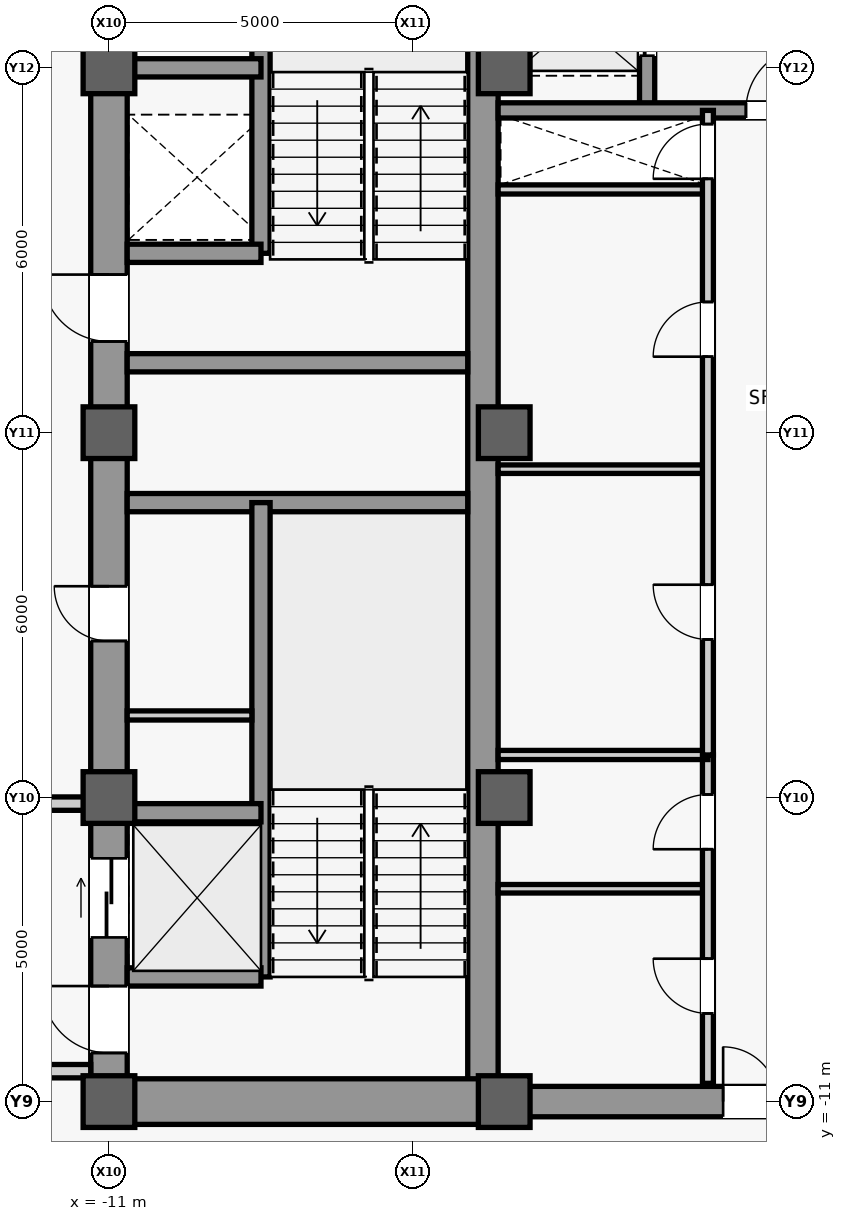
"""IFC4 building model, lengths in metres.
Left out: names, types, materials, properties, quantities, classifications, styles, units other than length and angle.
Written with IfcOpenShell. Run it as: python <this file> out.ifc"""

import sys

from ifc_helpers import new_model, si_unit, direction, frame, frame_2d, origin, origin_2d, place, context, subcontext, project, spatial, rectangle, extrude, source, transform, mapped, element, fill, save


model = new_model("IFC4")
c1 = context("Model", 3, precision=1e-05, world=origin(), true_north=direction((0.0, 1.0)))
c2 = subcontext(c1, "Body", "Model", "MODEL_VIEW")
j1 = project(units=[si_unit("LENGTHUNIT", "METRE"), si_unit("PLANEANGLEUNIT", "RADIAN")], contexts=[c1])
p1 = place(None, origin())
s1 = spatial("IfcSite", under=j1, at=p1, CompositionType="ELEMENT")
p2 = place(p1, origin())
s2 = spatial("IfcBuilding", under=s1, at=p2, CompositionType="ELEMENT")
p3 = place(p2, frame((0.0, 0.0, 203.1)))
s3 = spatial("IfcBuildingStorey", under=s2, at=p3, CompositionType="ELEMENT", Elevation=203.1)
m1 = source(origin(), c2, "Body", "SweptSolid", [
    extrude(rectangle(XDim=22.0, YDim=0.6, at=frame_2d((11.0, 0.0))), origin(), (0.0, 0.0, 1.0), 3.78),
])
p4 = place(p3, frame((-11.0, -11.0, 0.0), z_axis=(0.0, 0.0, 1.0), x_axis=(0.0, 1.0, 0.0)))
e1 = element("IfcWall", 1, at=p4, inside=s3, PredefinedType="SHEAR", context=c2, shape_type="MappedRepresentation", body=[
    mapped(m1, transform((0.0, 0.0, 0.0), scale=1.0)),
])
m2 = source(origin(), c2, "Body", "SweptSolid", [
    extrude(rectangle(XDim=1.1, YDim=2.2, at=frame_2d((0.55, 1.1))), frame((0.0, 0.31, 0.0), z_axis=(0.0, -1.0, 0.0), x_axis=(1.0, 0.0, 0.0)), (0.0, 0.0, 1.0), 0.62),
])
p5 = place(p4, frame((0.8, 0.0, 0.0)))
e2 = element("IfcOpeningElement", 2, at=p5, cuts=e1, PredefinedType="OPENING", context=c2, shape_type="MappedRepresentation", body=[
    mapped(m2, transform((0.0, 0.0, 0.0), scale=1.0)),
])
p6 = place(p4, frame((12.5, 0.0, 0.0)))
e3 = element("IfcOpeningElement", 3, at=p6, cuts=e1, PredefinedType="OPENING", context=c2, shape_type="MappedRepresentation", body=[
    mapped(m2, transform((0.0, 0.0, 0.0), scale=1.0)),
])
m3 = source(origin(), c2, "Body", "SweptSolid", [
    extrude(rectangle(XDim=0.9, YDim=2.15, at=frame_2d((0.45, 1.075))), frame((0.0, 0.31, 0.0), z_axis=(0.0, -1.0, 0.0), x_axis=(1.0, 0.0, 0.0)), (0.0, 0.0, 1.0), 0.62),
])
p7 = place(p4, frame((7.575, 0.0, 0.0)))
e4 = element("IfcOpeningElement", 4, at=p7, cuts=e1, PredefinedType="OPENING", context=c2, shape_type="MappedRepresentation", body=[
    mapped(m3, transform((0.0, 0.0, 0.0), scale=1.0)),
])
m4 = source(origin(), c2, "Body", "SweptSolid", [
    extrude(rectangle(XDim=1.3, YDim=2.3, at=frame_2d((0.65, 1.15))), frame((0.0, 0.31, 0.0), z_axis=(0.0, -1.0, 0.0), x_axis=(1.0, 0.0, 0.0)), (0.0, 0.0, 1.0), 0.62),
])
p8 = place(p4, frame((2.7, 0.0, 0.0)))
e5 = element("IfcOpeningElement", 5, at=p8, cuts=e1, PredefinedType="OPENING", context=c2, shape_type="MappedRepresentation", body=[
    mapped(m4, transform((0.0, 0.0, 0.0), scale=1.0)),
])
m5 = source(origin(), c2, "Body", "SweptSolid", [
    extrude(rectangle(XDim=21.4, YDim=0.5, at=frame_2d((10.7, 0.0))), origin(), (0.0, 0.0, 1.0), 3.78),
])
p9 = place(p3, frame((-4.85, -10.7, 0.0), z_axis=(0.0, 0.0, 1.0), x_axis=(0.0, 1.0, 0.0)))
e6 = element("IfcWall", 6, at=p9, inside=s3, PredefinedType="SHEAR", context=c2, shape_type="MappedRepresentation", body=[
    mapped(m5, transform((0.0, 0.0, 0.0), scale=1.0)),
])
m6 = source(origin(), c2, "Body", "SweptSolid", [
    extrude(rectangle(XDim=5.85, YDim=0.75, at=frame_2d((2.925, 0.0))), origin(), (0.0, 0.0, 1.0), 3.78),
])
p10 = place(p3, frame((-10.7, -11.0, 0.0), z_axis=(0.0, 0.0, 1.0), x_axis=(1.0, 0.0, 0.0)))
e7 = element("IfcWall", 7, at=p10, inside=s3, PredefinedType="SHEAR", context=c2, shape_type="MappedRepresentation", body=[
    mapped(m6, transform((0.0, 0.0, 0.0), scale=1.0)),
])
m7 = source(origin(), c2, "Body", "SweptSolid", [
    extrude(rectangle(XDim=5.6, YDim=0.3, at=frame_2d((2.8, 0.0))), origin(), (0.0, 0.0, 1.0), 3.78),
])
for number, where, z_axis, x_axis in (
    (8, (-10.7, -1.15, 0.0), (0.0, 0.0, 1.0), (1.0, 0.0, 0.0)),
    (9, (-10.7, 1.15, 0.0), (0.0, 0.0, 1.0), (1.0, 0.0, 0.0)),
):
    element("IfcWall", number, at=place(p3, frame(where, z_axis=z_axis, x_axis=x_axis)), inside=s3, PredefinedType="SHEAR", context=c2, shape_type="MappedRepresentation", body=[
        mapped(m7, transform((0.0, 0.0, 0.0), scale=1.0)),
    ])
m8 = source(origin(), c2, "Body", "SweptSolid", [
    extrude(rectangle(XDim=9.2, YDim=0.5, at=frame_2d((4.6, 0.0))), origin(), (0.0, 0.0, 1.0), 3.78),
])
p11 = place(p3, frame((-4.6, -11.0, 0.0), z_axis=(0.0, 0.0, 1.0), x_axis=(1.0, 0.0, 0.0)))
e10 = element("IfcWall", 10, at=p11, inside=s3, PredefinedType="SHEAR", context=c2, shape_type="MappedRepresentation", body=[
    mapped(m8, transform((0.0, 0.0, 0.0), scale=1.0)),
])
m9 = source(origin(), c2, "Body", "SweptSolid", [
    extrude(rectangle(XDim=1.8, YDim=2.25, at=frame_2d((0.9, 1.125))), frame((0.0, 0.26, 0.0), z_axis=(0.0, -1.0, 0.0), x_axis=(1.0, 0.0, 0.0)), (0.0, 0.0, 1.0), 0.52),
])
p12 = place(p11, frame((3.7, 0.0, 0.0)))
e11 = element("IfcOpeningElement", 11, at=p12, cuts=e10, PredefinedType="OPENING", context=c2, shape_type="MappedRepresentation", body=[
    mapped(m9, transform((0.0, 0.0, 0.0), scale=1.0)),
])
m10 = source(origin(), c2, "Body", "SweptSolid", [
    extrude(rectangle(XDim=0.85, YDim=0.85, at=origin_2d()), origin(), (0.0, 0.0, 1.0), 4.0),
])
for number, where, z_axis, x_axis in (
    (12, (-11.0, -11.0, 0.0), (0.0, 0.0, 1.0), (1.0, 0.0, 0.0)),
    (13, (-11.0, -6.0, 0.0), (0.0, 0.0, 1.0), (1.0, 0.0, 0.0)),
    (14, (-11.0, 0.0, 0.0), (0.0, 0.0, 1.0), (1.0, 0.0, 0.0)),
    (15, (-11.0, 6.0, 0.0), (0.0, 0.0, 1.0), (1.0, 0.0, 0.0)),
    (16, (-4.5, -11.0, 0.0), (0.0, 0.0, 1.0), (1.0, 0.0, 0.0)),
    (17, (-4.5, -6.0, 0.0), (0.0, 0.0, 1.0), (1.0, 0.0, 0.0)),
    (18, (-4.5, 0.0, 0.0), (0.0, 0.0, 1.0), (1.0, 0.0, 0.0)),
    (19, (-4.5, 6.0, 0.0), (0.0, 0.0, 1.0), (1.0, 0.0, 0.0)),
):
    element("IfcColumn", number, at=place(p3, frame(where, z_axis=z_axis, x_axis=x_axis)), inside=s3, PredefinedType="COLUMN", context=c2, shape_type="MappedRepresentation", body=[
        mapped(m10, transform((0.0, 0.0, 0.0), scale=1.0)),
    ])
m11 = source(origin(), c2, "Body", "SweptSolid", [
    extrude(rectangle(XDim=7.8, YDim=0.3, at=frame_2d((3.9, 0.0))), origin(), (0.0, 0.0, 1.0), 3.78),
])
p13 = place(p3, frame((-8.5, -8.95, 0.0), z_axis=(0.0, 0.0, 1.0), x_axis=(0.0, 1.0, 0.0)))
e20 = element("IfcWall", 20, at=p13, inside=s3, PredefinedType="SHEAR", context=c2, shape_type="MappedRepresentation", body=[
    mapped(m11, transform((0.0, 0.0, 0.0), scale=1.0)),
])
m12 = source(origin(), c2, "Body", "SweptSolid", [
    extrude(rectangle(XDim=2.2, YDim=0.3, at=frame_2d((1.1, 0.0))), origin(), (0.0, 0.0, 1.0), 3.78),
])
for number, where, z_axis, x_axis in (
    (21, (-10.7, -8.95, 0.0), (0.0, 0.0, 1.0), (1.0, 0.0, 0.0)),
    (22, (-10.7, -6.25, 0.0), (0.0, 0.0, 1.0), (1.0, 0.0, 0.0)),
):
    element("IfcWall", number, at=place(p3, frame(where, z_axis=z_axis, x_axis=x_axis)), inside=s3, PredefinedType="SHEAR", context=c2, shape_type="MappedRepresentation", body=[
        mapped(m12, transform((0.0, 0.0, 0.0), scale=1.0)),
    ])
m13 = source(origin(), c2, "Body", "SweptSolid", [
    extrude(rectangle(XDim=7.75, YDim=0.3, at=frame_2d((3.875, 0.0))), origin(), (0.0, 0.0, 1.0), 3.78),
])
p14 = place(p3, frame((-8.5, 2.95, 0.0), z_axis=(0.0, 0.0, 1.0), x_axis=(0.0, 1.0, 0.0)))
e23 = element("IfcWall", 23, at=p14, inside=s3, PredefinedType="SHEAR", context=c2, shape_type="MappedRepresentation", body=[
    mapped(m13, transform((0.0, 0.0, 0.0), scale=1.0)),
])
for number, where, z_axis, x_axis in (
    (24, (-10.7, 2.95, 0.0), (0.0, 0.0, 1.0), (1.0, 0.0, 0.0)),
    (25, (-10.7, 6.0, 0.0), (0.0, 0.0, 1.0), (1.0, 0.0, 0.0)),
):
    element("IfcWall", number, at=place(p3, frame(where, z_axis=z_axis, x_axis=x_axis)), inside=s3, PredefinedType="SHEAR", context=c2, shape_type="MappedRepresentation", body=[
        mapped(m12, transform((0.0, 0.0, 0.0), scale=1.0)),
    ])
m14 = source(origin(), c2, "Body", "SweptSolid", [
    extrude(rectangle(XDim=2.05, YDim=0.15, at=frame_2d((1.025, 0.0))), origin(), (0.0, 0.0, 1.0), 3.78),
])
p15 = place(p3, frame((-10.7, -4.65, 0.0), z_axis=(0.0, 0.0, 1.0), x_axis=(1.0, 0.0, 0.0)))
e26 = element("IfcWall", 26, at=p15, inside=s3, PredefinedType="PARTITIONING", context=c2, shape_type="MappedRepresentation", body=[
    mapped(m14, transform((0.0, 0.0, 0.0), scale=1.0)),
])
m15 = source(origin(), c2, "Body", "SweptSolid", [
    extrude(rectangle(XDim=4.05, YDim=0.22, at=frame_2d((2.025, 0.0))), origin(), (0.0, 0.0, 1.0), 3.78),
])
p16 = place(p3, frame((-15.35, -10.5, 0.0), z_axis=(0.0, 0.0, 1.0), x_axis=(1.0, 0.0, 0.0)))
e27 = element("IfcWall", 27, at=p16, inside=s3, PredefinedType="PARTITIONING", context=c2, shape_type="MappedRepresentation", body=[
    mapped(m15, transform((0.0, 0.0, 0.0), scale=1.0)),
])
m16 = source(origin(), c2, "Body", "SweptSolid", [
    extrude(rectangle(XDim=4.05, YDim=0.22, at=frame_2d((2.025, 0.0))), origin(), (0.0, 0.0, 1.0), 3.007),
])
p17 = place(p3, frame((-15.35, -6.1, 0.0), z_axis=(0.0, 0.0, 1.0), x_axis=(1.0, 0.0, 0.0)))
e28 = element("IfcWall", 28, at=p17, inside=s3, PredefinedType="PARTITIONING", context=c2, shape_type="MappedRepresentation", body=[
    mapped(m16, transform((0.0, 0.0, 0.0), scale=1.0)),
])
m17 = source(origin(), c2, "Body", "SweptSolid", [
    extrude(rectangle(XDim=3.45, YDim=0.15, at=frame_2d((1.725, 0.0))), origin(), (0.0, 0.0, 1.0), 3.78),
])
p18 = place(p3, frame((-4.6, 4.0, 0.0), z_axis=(0.0, 0.0, 1.0), x_axis=(1.0, 0.0, 0.0)))
e29 = element("IfcWall", 29, at=p18, inside=s3, PredefinedType="PARTITIONING", context=c2, shape_type="MappedRepresentation", body=[
    mapped(m17, transform((0.0, 0.0, 0.0), scale=1.0)),
])
m18 = source(origin(), c2, "Body", "SweptSolid", [
    extrude(rectangle(XDim=3.45, YDim=0.14, at=frame_2d((1.725, 0.0))), origin(), (0.0, 0.0, 1.0), 3.78),
])
p19 = place(p3, frame((-4.6, -7.5, 0.0), z_axis=(0.0, 0.0, 1.0), x_axis=(1.0, 0.0, 0.0)))
e30 = element("IfcWall", 30, at=p19, inside=s3, PredefinedType="PARTITIONING", context=c2, shape_type="MappedRepresentation", body=[
    mapped(m18, transform((0.0, 0.0, 0.0), scale=1.0)),
])
m19 = source(origin(), c2, "Body", "SweptSolid", [
    extrude(rectangle(XDim=5.4, YDim=0.18, at=frame_2d((2.7, 0.0))), origin(), (0.0, 0.0, 1.0), 3.78),
])
p20 = place(p3, frame((-1.15, -10.7, 0.0), z_axis=(0.0, 0.0, 1.0), x_axis=(0.0, 1.0, 0.0)))
e31 = element("IfcWall", 31, at=p20, inside=s3, PredefinedType="PARTITIONING", context=c2, shape_type="MappedRepresentation", body=[
    mapped(m19, transform((0.0, 0.0, 0.0), scale=1.0)),
])
m20 = source(origin(), c2, "Body", "SweptSolid", [
    extrude(rectangle(XDim=0.9, YDim=2.15, at=frame_2d((0.45, 1.075))), frame((0.0, 0.1, 0.0), z_axis=(0.0, -1.0, 0.0), x_axis=(1.0, 0.0, 0.0)), (0.0, 0.0, 1.0), 0.2),
])
p21 = place(p20, frame((1.15, 0.0, 0.0)))
e32 = element("IfcOpeningElement", 32, at=p21, cuts=e31, PredefinedType="OPENING", context=c2, shape_type="MappedRepresentation", body=[
    mapped(m20, transform((0.0, 0.0, 0.0), scale=1.0)),
])
p22 = place(p20, frame((3.85, 0.0, 0.0)))
e33 = element("IfcOpeningElement", 33, at=p22, cuts=e31, PredefinedType="OPENING", context=c2, shape_type="MappedRepresentation", body=[
    mapped(m20, transform((0.0, 0.0, 0.0), scale=1.0)),
])
p23 = place(p3, frame((-4.6, -5.3, 0.0), z_axis=(0.0, 0.0, 1.0), x_axis=(1.0, 0.0, 0.0)))
e34 = element("IfcWall", 34, at=p23, inside=s3, PredefinedType="PARTITIONING", context=c2, shape_type="MappedRepresentation", body=[
    mapped(m17, transform((0.0, 0.0, 0.0), scale=1.0)),
])
m21 = source(origin(), c2, "Body", "SweptSolid", [
    extrude(rectangle(XDim=5.4, YDim=0.25, at=frame_2d((2.7, 0.0))), origin(), (0.0, 0.0, 1.0), 3.78),
])
p24 = place(p3, frame((-2.15, 5.3, 0.0), z_axis=(0.0, 0.0, 1.0), x_axis=(0.0, 1.0, 0.0)))
e35 = element("IfcWall", 35, at=p24, inside=s3, PredefinedType="SHEAR", context=c2, shape_type="MappedRepresentation", body=[
    mapped(m21, transform((0.0, 0.0, 0.0), scale=1.0)),
])
m22 = source(origin(), c2, "Body", "SweptSolid", [
    extrude(rectangle(XDim=1.2, YDim=2.3, at=frame_2d((0.6, 1.15))), frame((0.0, 0.135, 0.0), z_axis=(0.0, -1.0, 0.0), x_axis=(1.0, 0.0, 0.0)), (0.0, 0.0, 1.0), 0.27),
])
p25 = place(p24, frame((3.3, 0.0, 0.0)))
e36 = element("IfcOpeningElement", 36, at=p25, cuts=e35, PredefinedType="OPENING", context=c2, shape_type="MappedRepresentation", body=[
    mapped(m22, transform((0.0, 0.0, 0.0), scale=1.0)),
])
p26 = place(p24, frame((0.9, 0.0, 0.0)))
e37 = element("IfcOpeningElement", 37, at=p26, cuts=e35, PredefinedType="OPENING", context=c2, shape_type="MappedRepresentation", body=[
    mapped(m22, transform((0.0, 0.0, 0.0), scale=1.0)),
])
m23 = source(origin(), c2, "Body", "SweptSolid", [
    extrude(rectangle(XDim=9.2, YDim=0.25, at=frame_2d((4.6, 0.0))), origin(), (0.0, 0.0, 1.0), 3.78),
])
p27 = place(p3, frame((-4.6, 5.3, 0.0), z_axis=(0.0, 0.0, 1.0), x_axis=(1.0, 0.0, 0.0)))
e38 = element("IfcWall", 38, at=p27, inside=s3, PredefinedType="SHEAR", context=c2, shape_type="MappedRepresentation", body=[
    mapped(m23, transform((0.0, 0.0, 0.0), scale=1.0)),
])
m24 = source(origin(), c2, "Body", "SweptSolid", [
    extrude(rectangle(XDim=1.05, YDim=2.2, at=frame_2d((0.525, 1.1))), frame((0.0, 0.135, 0.0), z_axis=(0.0, -1.0, 0.0), x_axis=(1.0, 0.0, 0.0)), (0.0, 0.0, 1.0), 0.27),
])
p28 = place(p27, frame((4.075, 0.0, 0.0)))
e39 = element("IfcOpeningElement", 39, at=p28, cuts=e38, PredefinedType="OPENING", context=c2, shape_type="MappedRepresentation", body=[
    mapped(m24, transform((0.0, 0.0, 0.0), scale=1.0)),
])
p29 = place(p3, frame((-4.6, -0.6, 0.0), z_axis=(0.0, 0.0, 1.0), x_axis=(1.0, 0.0, 0.0)))
e40 = element("IfcWall", 40, at=p29, inside=s3, PredefinedType="PARTITIONING", context=c2, shape_type="MappedRepresentation", body=[
    mapped(m18, transform((0.0, 0.0, 0.0), scale=1.0)),
])
m25 = source(origin(), c2, "Body", "SweptSolid", [
    extrude(rectangle(XDim=10.6, YDim=0.18, at=frame_2d((5.3, 0.0))), origin(), (0.0, 0.0, 1.0), 3.78),
])
p30 = place(p3, frame((-1.15, -5.3, 0.0), z_axis=(0.0, 0.0, 1.0), x_axis=(0.0, 1.0, 0.0)))
e41 = element("IfcWall", 41, at=p30, inside=s3, PredefinedType="PARTITIONING", context=c2, shape_type="MappedRepresentation", body=[
    mapped(m25, transform((0.0, 0.0, 0.0), scale=1.0)),
])
p31 = place(p30, frame((1.9, 0.0, 0.0)))
e42 = element("IfcOpeningElement", 42, at=p31, cuts=e41, PredefinedType="OPENING", context=c2, shape_type="MappedRepresentation", body=[
    mapped(m20, transform((0.0, 0.0, 0.0), scale=1.0)),
])
p32 = place(p30, frame((6.55, 0.0, 0.0)))
e43 = element("IfcOpeningElement", 43, at=p32, cuts=e41, PredefinedType="OPENING", context=c2, shape_type="MappedRepresentation", body=[
    mapped(m20, transform((0.0, 0.0, 0.0), scale=1.0)),
])
p33 = place(p30, frame((9.475, 0.0, 0.0)))
e44 = element("IfcOpeningElement", 44, at=p33, cuts=e41, PredefinedType="OPENING", context=c2, shape_type="MappedRepresentation", body=[
    mapped(m20, transform((0.0, 0.0, 0.0), scale=1.0)),
])
m26 = source(origin(), c2, "Body", "SweptSolid", [
    extrude(rectangle(XDim=1.1, YDim=2.2, at=frame_2d((0.55, 1.1))), frame((0.0, 0.025, 0.0), z_axis=(0.0, -1.0, 0.0), x_axis=(1.0, 0.0, 0.0)), (0.0, 0.0, 1.0), 0.05),
])
p34 = place(p5, origin())
e45 = element("IfcDoor", 45, at=p34, inside=s3, OperationType="SINGLE_SWING_RIGHT", PredefinedType="DOOR", context=c2, shape_type="MappedRepresentation", body=[
    mapped(m26, transform((0.0, 0.0, 0.0), scale=1.0)),
])
fill(e2, e45)
p35 = place(p6, origin())
e46 = element("IfcDoor", 46, at=p35, inside=s3, OperationType="SINGLE_SWING_RIGHT", PredefinedType="DOOR", context=c2, shape_type="MappedRepresentation", body=[
    mapped(m26, transform((0.0, 0.0, 0.0), scale=1.0)),
])
fill(e3, e46)
m27 = source(origin(), c2, "Body", "SweptSolid", [
    extrude(rectangle(XDim=0.9, YDim=2.15, at=frame_2d((0.45, 1.075))), frame((0.0, 0.025, 0.0), z_axis=(0.0, -1.0, 0.0), x_axis=(1.0, 0.0, 0.0)), (0.0, 0.0, 1.0), 0.05),
])
p36 = place(p7, origin())
e47 = element("IfcDoor", 47, at=p36, inside=s3, OperationType="SINGLE_SWING_RIGHT", PredefinedType="DOOR", context=c2, shape_type="MappedRepresentation", body=[
    mapped(m27, transform((0.0, 0.0, 0.0), scale=1.0)),
])
fill(e4, e47)
p37 = place(p21, origin())
e48 = element("IfcDoor", 48, at=p37, inside=s3, OperationType="SINGLE_SWING_RIGHT", PredefinedType="DOOR", context=c2, shape_type="MappedRepresentation", body=[
    mapped(m27, transform((0.0, 0.0, 0.0), scale=1.0)),
])
fill(e32, e48)
p38 = place(p22, origin())
e49 = element("IfcDoor", 49, at=p38, inside=s3, OperationType="SINGLE_SWING_LEFT", PredefinedType="DOOR", context=c2, shape_type="MappedRepresentation", body=[
    mapped(m27, transform((0.0, 0.0, 0.0), scale=1.0)),
])
fill(e33, e49)
m28 = source(origin(), c2, "Body", "SweptSolid", [
    extrude(rectangle(XDim=1.8, YDim=2.25, at=frame_2d((0.9, 1.125))), frame((0.0, 0.025, 0.0), z_axis=(0.0, -1.0, 0.0), x_axis=(1.0, 0.0, 0.0)), (0.0, 0.0, 1.0), 0.05),
])
p39 = place(p12, origin())
e50 = element("IfcDoor", 50, at=p39, inside=s3, OperationType="SINGLE_SWING_LEFT", PredefinedType="DOOR", context=c2, shape_type="MappedRepresentation", body=[
    mapped(m28, transform((0.0, 0.0, 0.0), scale=1.0)),
])
fill(e11, e50)
m29 = source(origin(), c2, "Body", "SweptSolid", [
    extrude(rectangle(XDim=1.05, YDim=2.2, at=frame_2d((0.525, 1.1))), frame((0.0, 0.025, 0.0), z_axis=(0.0, -1.0, 0.0), x_axis=(1.0, 0.0, 0.0)), (0.0, 0.0, 1.0), 0.05),
])
p40 = place(p28, origin())
e51 = element("IfcDoor", 51, at=p40, inside=s3, OperationType="SINGLE_SWING_RIGHT", PredefinedType="DOOR", context=c2, shape_type="MappedRepresentation", body=[
    mapped(m29, transform((0.0, 0.0, 0.0), scale=1.0)),
])
fill(e39, e51)
p41 = place(p31, origin())
e52 = element("IfcDoor", 52, at=p41, inside=s3, OperationType="SINGLE_SWING_RIGHT", PredefinedType="DOOR", context=c2, shape_type="MappedRepresentation", body=[
    mapped(m27, transform((0.0, 0.0, 0.0), scale=1.0)),
])
fill(e42, e52)
p42 = place(p32, origin())
e53 = element("IfcDoor", 53, at=p42, inside=s3, OperationType="SINGLE_SWING_LEFT", PredefinedType="DOOR", context=c2, shape_type="MappedRepresentation", body=[
    mapped(m27, transform((0.0, 0.0, 0.0), scale=1.0)),
])
fill(e43, e53)
p43 = place(p33, origin())
e54 = element("IfcDoor", 54, at=p43, inside=s3, OperationType="SINGLE_SWING_LEFT", PredefinedType="DOOR", context=c2, shape_type="MappedRepresentation", body=[
    mapped(m27, transform((0.0, 0.0, 0.0), scale=1.0)),
])
fill(e44, e54)
m30 = source(origin(), c2, "Body", "SweptSolid", [
    extrude(rectangle(XDim=1.2, YDim=2.3, at=frame_2d((0.6, 1.15))), frame((0.0, 0.025, 0.0), z_axis=(0.0, -1.0, 0.0), x_axis=(1.0, 0.0, 0.0)), (0.0, 0.0, 1.0), 0.05),
])
p44 = place(p26, origin())
e55 = element("IfcDoor", 55, at=p44, inside=s3, OperationType="SLIDING_TO_LEFT", PredefinedType="DOOR", context=c2, shape_type="MappedRepresentation", body=[
    mapped(m30, transform((0.0, 0.0, 0.0), scale=1.0)),
])
fill(e37, e55)
m31 = source(origin(), c2, "Body", "SweptSolid", [
    extrude(rectangle(XDim=1.3, YDim=2.3, at=frame_2d((0.65, 1.15))), frame((0.0, 0.025, 0.0), z_axis=(0.0, -1.0, 0.0), x_axis=(1.0, 0.0, 0.0)), (0.0, 0.0, 1.0), 0.05),
])
p45 = place(p8, origin())
e56 = element("IfcDoor", 56, at=p45, inside=s3, OperationType="SLIDING_TO_LEFT", PredefinedType="DOOR", context=c2, shape_type="MappedRepresentation", body=[
    mapped(m31, transform((0.0, 0.0, 0.0), scale=1.0)),
])
fill(e5, e56)
save(model, sys.argv[1])
